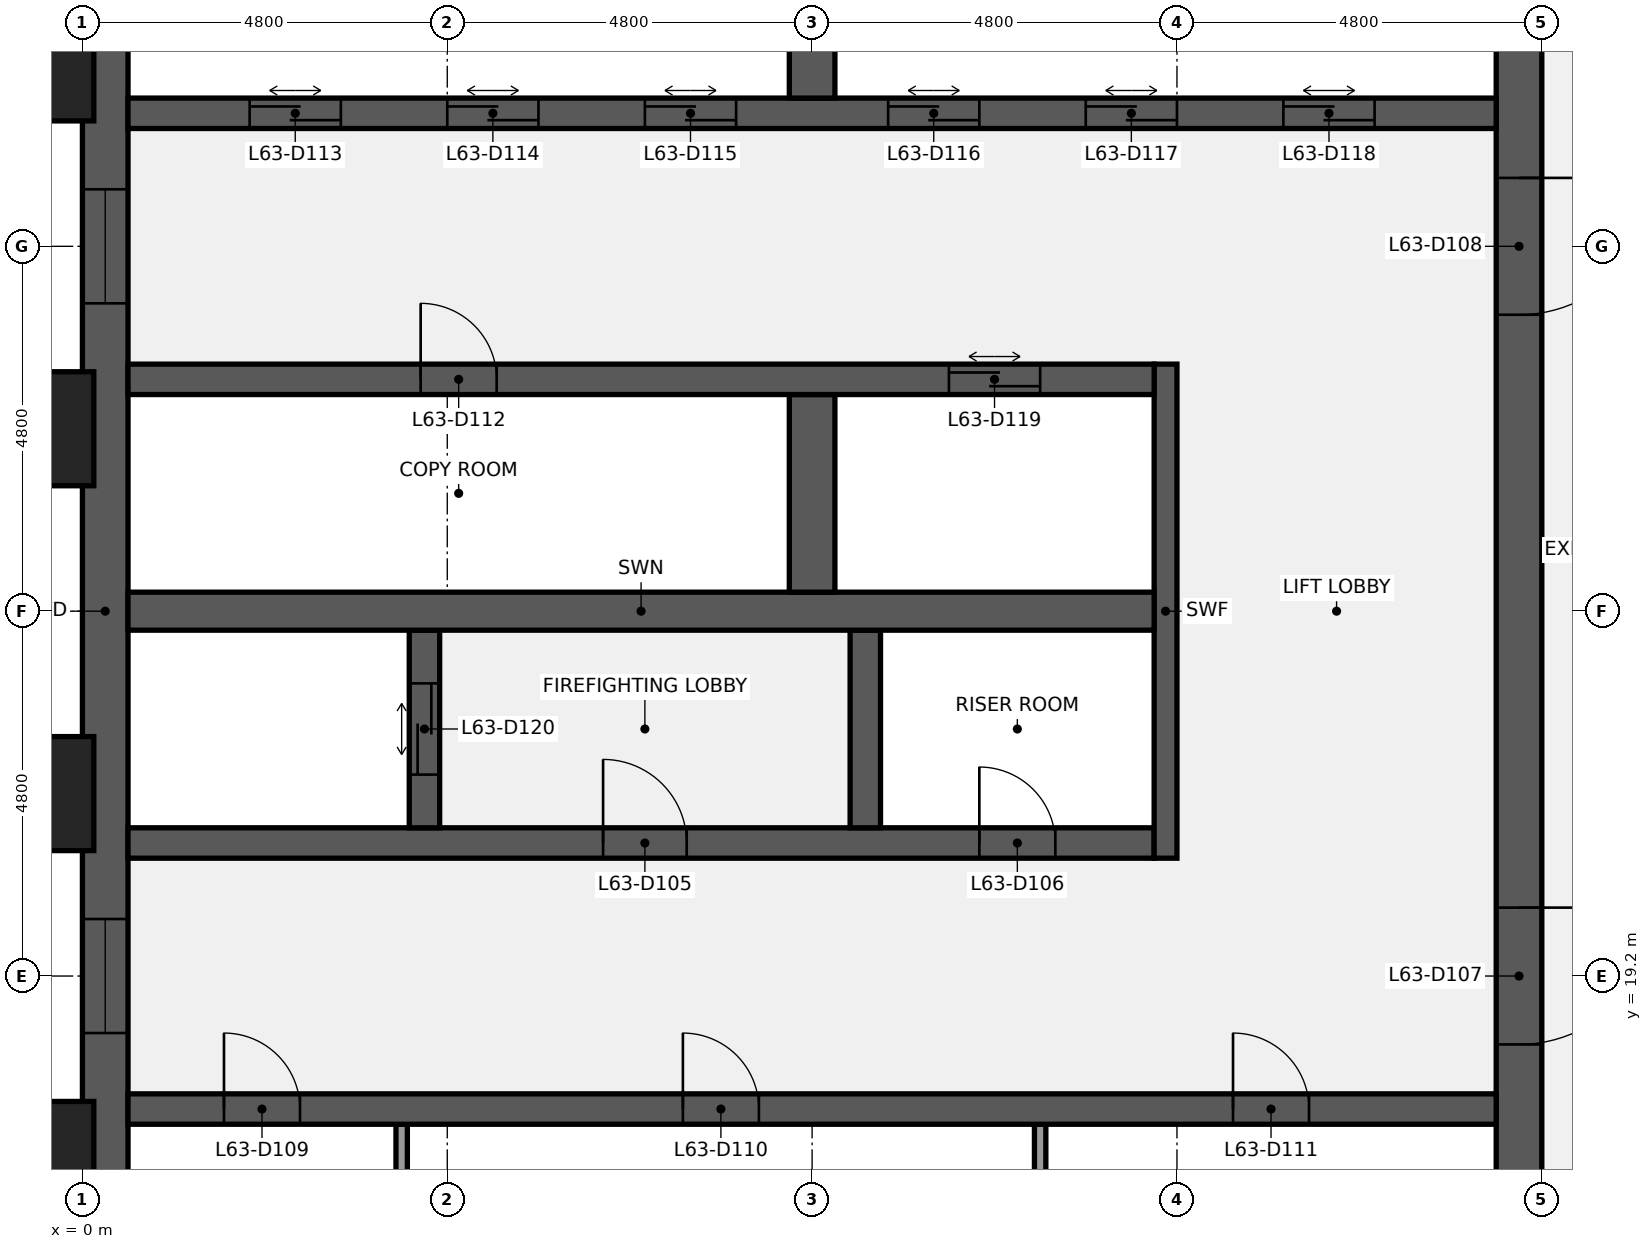
"""IFC4 building model, lengths in metres.
Left out: names, types, materials, properties, quantities, classifications, styles, units other than length and angle.
Written with IfcOpenShell. Run it as: python <this file> out.ifc"""

import sys

from ifc_helpers import new_model, si_unit, direction, frame, frame_2d, origin, origin_2d, place, context, subcontext, project, spatial, rectangle, extrude, element, fill, save


model = new_model("IFC4")
c1 = context("Model", 3, precision=1e-05, world=origin(), true_north=direction((0.0, 1.0)))
c2 = subcontext(c1, "Body", "Model", "MODEL_VIEW")
j1 = project(units=[si_unit("LENGTHUNIT", "METRE"), si_unit("PLANEANGLEUNIT", "RADIAN")], contexts=[c1])
p1 = place(None, origin())
s1 = spatial("IfcSite", under=j1, at=p1, CompositionType="ELEMENT")
p2 = place(p1, origin())
s2 = spatial("IfcBuilding", under=s1, at=p2, CompositionType="ELEMENT")
p3 = place(p2, frame((0.0, 0.0, 290.3)))
s3 = spatial("IfcBuildingStorey", under=s2, at=p3, CompositionType="ELEMENT", Elevation=290.3)
p4 = place(p3, frame((0.3, 9.6, 0.0), z_axis=(0.0, 0.0, 1.0), x_axis=(0.0, 1.0, 0.0)))
e1 = element("IfcWall", 1, at=p4, inside=s3, PredefinedType="SHEAR", context=c2, shape_type="SweptSolid", body=[
    extrude(rectangle(XDim=28.8, YDim=0.6, at=frame_2d((14.4, 0.0))), origin(), (0.0, 0.0, 1.0), 3.84),
])
p5 = place(p4, frame((8.85, 0.0, 0.9)))
e2 = element("IfcOpeningElement", 2, at=p5, cuts=e1, PredefinedType="OPENING", context=c2, shape_type="SweptSolid", body=[
    extrude(rectangle(XDim=1.5, YDim=1.5, at=frame_2d((0.75, 0.75))), frame((0.0, 0.31, 0.0), z_axis=(0.0, -1.0, 0.0), x_axis=(1.0, 0.0, 0.0)), (0.0, 0.0, 1.0), 0.62),
])
p6 = place(p4, frame((18.45, 0.0, 0.9)))
e3 = element("IfcOpeningElement", 3, at=p6, cuts=e1, PredefinedType="OPENING", context=c2, shape_type="SweptSolid", body=[
    extrude(rectangle(XDim=1.5, YDim=1.5, at=frame_2d((0.75, 0.75))), frame((0.0, 0.31, 0.0), z_axis=(0.0, -1.0, 0.0), x_axis=(1.0, 0.0, 0.0)), (0.0, 0.0, 1.0), 0.62),
])
p7 = place(p3, frame((18.9, 38.4, 0.0), z_axis=(0.0, 0.0, 1.0), x_axis=(0.0, -1.0, 0.0)))
e4 = element("IfcWall", 4, at=p7, inside=s3, PredefinedType="SHEAR", context=c2, shape_type="SweptSolid", body=[
    extrude(rectangle(XDim=28.8, YDim=0.6, at=frame_2d((14.4, 0.0))), origin(), (0.0, 0.0, 1.0), 3.84),
])
p8 = place(p7, frame((18.3, 0.0, 0.0)))
e5 = element("IfcOpeningElement", 5, at=p8, cuts=e4, PredefinedType="OPENING", context=c2, shape_type="SweptSolid", body=[
    extrude(rectangle(XDim=1.8, YDim=2.1, at=frame_2d((0.9, 1.05))), frame((0.0, 0.31, 0.0), z_axis=(0.0, -1.0, 0.0), x_axis=(1.0, 0.0, 0.0)), (0.0, 0.0, 1.0), 0.62),
])
p9 = place(p7, frame((8.7, 0.0, 0.0)))
e6 = element("IfcOpeningElement", 6, at=p9, cuts=e4, PredefinedType="OPENING", context=c2, shape_type="SweptSolid", body=[
    extrude(rectangle(XDim=1.8, YDim=2.1, at=frame_2d((0.9, 1.05))), frame((0.0, 0.31, 0.0), z_axis=(0.0, -1.0, 0.0), x_axis=(1.0, 0.0, 0.0)), (0.0, 0.0, 1.0), 0.62),
])
for number, where, z_axis, x_axis in (
    (7, (4.2, 14.65, 0.0), (0.0, 0.0, 1.0), (0.0, 1.0, 0.0)),
    (8, (12.6, 14.65, 0.0), (0.0, 0.0, 1.0), (0.0, 1.0, 0.0)),
):
    element("IfcWall", number, at=place(p3, frame(where, z_axis=z_axis, x_axis=x_axis)), inside=s3, PredefinedType="PARTITIONING", context=c2, shape_type="SweptSolid", body=[
        extrude(rectangle(XDim=2.6, YDim=0.15, at=frame_2d((1.3, 0.0))), origin(), (0.0, 0.0, 1.0), 3.84),
    ])
p10 = place(p3, frame((0.6, 17.45, 0.0), z_axis=(0.0, 0.0, 1.0), x_axis=(1.0, 0.0, 0.0)))
e9 = element("IfcWall", 9, at=p10, inside=s3, PredefinedType="SHEAR", context=c2, shape_type="SweptSolid", body=[
    extrude(rectangle(XDim=18.0, YDim=0.4, at=frame_2d((9.0, 0.0))), origin(), (0.0, 0.0, 1.0), 3.84),
])
p11 = place(p10, frame((1.262, 0.0, 0.0)))
e10 = element("IfcOpeningElement", 10, at=p11, cuts=e9, PredefinedType="OPENING", context=c2, shape_type="SweptSolid", body=[
    extrude(rectangle(XDim=1.0, YDim=2.1, at=frame_2d((0.5, 1.05))), frame((0.0, 0.21, 0.0), z_axis=(0.0, -1.0, 0.0), x_axis=(1.0, 0.0, 0.0)), (0.0, 0.0, 1.0), 0.42),
])
p12 = place(p10, frame((7.3, 0.0, 0.0)))
e11 = element("IfcOpeningElement", 11, at=p12, cuts=e9, PredefinedType="OPENING", context=c2, shape_type="SweptSolid", body=[
    extrude(rectangle(XDim=1.0, YDim=2.1, at=frame_2d((0.5, 1.05))), frame((0.0, 0.21, 0.0), z_axis=(0.0, -1.0, 0.0), x_axis=(1.0, 0.0, 0.0)), (0.0, 0.0, 1.0), 0.42),
])
p13 = place(p10, frame((14.538, 0.0, 0.0)))
e12 = element("IfcOpeningElement", 12, at=p13, cuts=e9, PredefinedType="OPENING", context=c2, shape_type="SweptSolid", body=[
    extrude(rectangle(XDim=1.0, YDim=2.1, at=frame_2d((0.5, 1.05))), frame((0.0, 0.21, 0.0), z_axis=(0.0, -1.0, 0.0), x_axis=(1.0, 0.0, 0.0)), (0.0, 0.0, 1.0), 0.42),
])
p14 = place(p3, frame((0.6, 20.95, 0.0), z_axis=(0.0, 0.0, 1.0), x_axis=(1.0, 0.0, 0.0)))
e13 = element("IfcWall", 13, at=p14, inside=s3, PredefinedType="SHEAR", context=c2, shape_type="SweptSolid", body=[
    extrude(rectangle(XDim=13.5, YDim=0.4, at=frame_2d((6.75, 0.0))), origin(), (0.0, 0.0, 1.0), 3.84),
])
p15 = place(p14, frame((6.25, 0.0, 0.0)))
e14 = element("IfcOpeningElement", 14, at=p15, cuts=e13, PredefinedType="OPENING", context=c2, shape_type="SweptSolid", body=[
    extrude(rectangle(XDim=1.1, YDim=2.1, at=frame_2d((0.55, 1.05))), frame((0.0, 0.21, 0.0), z_axis=(0.0, -1.0, 0.0), x_axis=(1.0, 0.0, 0.0)), (0.0, 0.0, 1.0), 0.42),
])
p16 = place(p14, frame((11.2, 0.0, 0.0)))
e15 = element("IfcOpeningElement", 15, at=p16, cuts=e13, PredefinedType="OPENING", context=c2, shape_type="SweptSolid", body=[
    extrude(rectangle(XDim=1.0, YDim=2.1, at=frame_2d((0.5, 1.05))), frame((0.0, 0.21, 0.0), z_axis=(0.0, -1.0, 0.0), x_axis=(1.0, 0.0, 0.0)), (0.0, 0.0, 1.0), 0.42),
])
p17 = place(p3, frame((14.25, 20.75, 0.0), z_axis=(0.0, 0.0, 1.0), x_axis=(0.0, 1.0, 0.0)))
e16 = element("IfcWall", 16, at=p17, inside=s3, PredefinedType="SHEAR", context=c2, shape_type="SweptSolid", body=[
    extrude(rectangle(XDim=6.5, YDim=0.3, at=frame_2d((3.25, 0.0))), origin(), (0.0, 0.0, 1.0), 3.84),
])
p18 = place(p3, frame((4.5, 21.15, 0.0), z_axis=(0.0, 0.0, 1.0), x_axis=(0.0, 1.0, 0.0)))
e17 = element("IfcWall", 17, at=p18, inside=s3, PredefinedType="SHEAR", context=c2, shape_type="SweptSolid", body=[
    extrude(rectangle(XDim=2.6, YDim=0.4, at=frame_2d((1.3, 0.0))), origin(), (0.0, 0.0, 1.0), 3.84),
])
p19 = place(p18, frame((0.7, 0.0, 0.0)))
e18 = element("IfcOpeningElement", 18, at=p19, cuts=e17, PredefinedType="OPENING", context=c2, shape_type="SweptSolid", body=[
    extrude(rectangle(XDim=1.2, YDim=2.1, at=frame_2d((0.6, 1.05))), frame((0.0, 0.21, 0.0), z_axis=(0.0, -1.0, 0.0), x_axis=(1.0, 0.0, 0.0)), (0.0, 0.0, 1.0), 0.42),
])
p20 = place(p3, frame((10.3, 21.15, 0.0), z_axis=(0.0, 0.0, 1.0), x_axis=(0.0, 1.0, 0.0)))
e19 = element("IfcWall", 19, at=p20, inside=s3, PredefinedType="SHEAR", context=c2, shape_type="SweptSolid", body=[
    extrude(rectangle(XDim=2.6, YDim=0.4, at=frame_2d((1.3, 0.0))), origin(), (0.0, 0.0, 1.0), 3.84),
])
p21 = place(p3, frame((0.6, 24.0, 0.0), z_axis=(0.0, 0.0, 1.0), x_axis=(1.0, 0.0, 0.0)))
e20 = element("IfcWall", 20, at=p21, inside=s3, PredefinedType="SHEAR", context=c2, shape_type="SweptSolid", body=[
    extrude(rectangle(XDim=13.5, YDim=0.5, at=frame_2d((6.75, 0.0))), origin(), (0.0, 0.0, 1.0), 3.84),
])
p22 = place(p3, frame((9.6, 24.25, 0.0), z_axis=(0.0, 0.0, 1.0), x_axis=(0.0, 1.0, 0.0)))
e21 = element("IfcWall", 21, at=p22, inside=s3, PredefinedType="SHEAR", context=c2, shape_type="SweptSolid", body=[
    extrude(rectangle(XDim=2.6, YDim=0.6, at=frame_2d((1.3, 0.0))), origin(), (0.0, 0.0, 1.0), 3.84),
])
p23 = place(p3, frame((0.6, 27.05, 0.0), z_axis=(0.0, 0.0, 1.0), x_axis=(1.0, 0.0, 0.0)))
e22 = element("IfcWall", 22, at=p23, inside=s3, PredefinedType="SHEAR", context=c2, shape_type="SweptSolid", body=[
    extrude(rectangle(XDim=13.5, YDim=0.4, at=frame_2d((6.75, 0.0))), origin(), (0.0, 0.0, 1.0), 3.84),
])
p24 = place(p23, frame((3.85, 0.0, 0.0)))
e23 = element("IfcOpeningElement", 23, at=p24, cuts=e22, PredefinedType="OPENING", context=c2, shape_type="SweptSolid", body=[
    extrude(rectangle(XDim=1.0, YDim=2.1, at=frame_2d((0.5, 1.05))), frame((0.0, 0.21, 0.0), z_axis=(0.0, -1.0, 0.0), x_axis=(1.0, 0.0, 0.0)), (0.0, 0.0, 1.0), 0.42),
])
p25 = place(p23, frame((10.8, 0.0, 0.0)))
e24 = element("IfcOpeningElement", 24, at=p25, cuts=e22, PredefinedType="OPENING", context=c2, shape_type="SweptSolid", body=[
    extrude(rectangle(XDim=1.2, YDim=2.1, at=frame_2d((0.6, 1.05))), frame((0.0, 0.21, 0.0), z_axis=(0.0, -1.0, 0.0), x_axis=(1.0, 0.0, 0.0)), (0.0, 0.0, 1.0), 0.42),
])
p26 = place(p3, frame((0.6, 30.55, 0.0), z_axis=(0.0, 0.0, 1.0), x_axis=(1.0, 0.0, 0.0)))
e25 = element("IfcWall", 25, at=p26, inside=s3, PredefinedType="SHEAR", context=c2, shape_type="SweptSolid", body=[
    extrude(rectangle(XDim=18.0, YDim=0.4, at=frame_2d((9.0, 0.0))), origin(), (0.0, 0.0, 1.0), 3.84),
])
p27 = place(p26, frame((1.6, 0.0, 0.0)))
e26 = element("IfcOpeningElement", 26, at=p27, cuts=e25, PredefinedType="OPENING", context=c2, shape_type="SweptSolid", body=[
    extrude(rectangle(XDim=1.2, YDim=2.1, at=frame_2d((0.6, 1.05))), frame((0.0, 0.21, 0.0), z_axis=(0.0, -1.0, 0.0), x_axis=(1.0, 0.0, 0.0)), (0.0, 0.0, 1.0), 0.42),
])
p28 = place(p26, frame((4.2, 0.0, 0.0)))
e27 = element("IfcOpeningElement", 27, at=p28, cuts=e25, PredefinedType="OPENING", context=c2, shape_type="SweptSolid", body=[
    extrude(rectangle(XDim=1.2, YDim=2.1, at=frame_2d((0.6, 1.05))), frame((0.0, 0.21, 0.0), z_axis=(0.0, -1.0, 0.0), x_axis=(1.0, 0.0, 0.0)), (0.0, 0.0, 1.0), 0.42),
])
p29 = place(p26, frame((6.8, 0.0, 0.0)))
e28 = element("IfcOpeningElement", 28, at=p29, cuts=e25, PredefinedType="OPENING", context=c2, shape_type="SweptSolid", body=[
    extrude(rectangle(XDim=1.2, YDim=2.1, at=frame_2d((0.6, 1.05))), frame((0.0, 0.21, 0.0), z_axis=(0.0, -1.0, 0.0), x_axis=(1.0, 0.0, 0.0)), (0.0, 0.0, 1.0), 0.42),
])
p30 = place(p26, frame((10.0, 0.0, 0.0)))
e29 = element("IfcOpeningElement", 29, at=p30, cuts=e25, PredefinedType="OPENING", context=c2, shape_type="SweptSolid", body=[
    extrude(rectangle(XDim=1.2, YDim=2.1, at=frame_2d((0.6, 1.05))), frame((0.0, 0.21, 0.0), z_axis=(0.0, -1.0, 0.0), x_axis=(1.0, 0.0, 0.0)), (0.0, 0.0, 1.0), 0.42),
])
p31 = place(p26, frame((12.6, 0.0, 0.0)))
e30 = element("IfcOpeningElement", 30, at=p31, cuts=e25, PredefinedType="OPENING", context=c2, shape_type="SweptSolid", body=[
    extrude(rectangle(XDim=1.2, YDim=2.1, at=frame_2d((0.6, 1.05))), frame((0.0, 0.21, 0.0), z_axis=(0.0, -1.0, 0.0), x_axis=(1.0, 0.0, 0.0)), (0.0, 0.0, 1.0), 0.42),
])
p32 = place(p26, frame((15.2, 0.0, 0.0)))
e31 = element("IfcOpeningElement", 31, at=p32, cuts=e25, PredefinedType="OPENING", context=c2, shape_type="SweptSolid", body=[
    extrude(rectangle(XDim=1.2, YDim=2.1, at=frame_2d((0.6, 1.05))), frame((0.0, 0.21, 0.0), z_axis=(0.0, -1.0, 0.0), x_axis=(1.0, 0.0, 0.0)), (0.0, 0.0, 1.0), 0.42),
])
p33 = place(p3, frame((9.6, 30.75, 0.0), z_axis=(0.0, 0.0, 1.0), x_axis=(0.0, 1.0, 0.0)))
e32 = element("IfcWall", 32, at=p33, inside=s3, PredefinedType="SHEAR", context=c2, shape_type="SweptSolid", body=[
    extrude(rectangle(XDim=2.6, YDim=0.6, at=frame_2d((1.3, 0.0))), origin(), (0.0, 0.0, 1.0), 3.84),
])
for number, where, z_axis, x_axis in (
    (33, (-0.75, 16.8, 0.0), (0.0, 0.0, 1.0), (0.0, 1.0, 0.0)),
    (34, (-0.75, 21.6, 0.0), (0.0, 0.0, 1.0), (0.0, 1.0, 0.0)),
    (35, (-0.75, 26.4, 0.0), (0.0, 0.0, 1.0), (0.0, 1.0, 0.0)),
    (36, (-0.75, 31.2, 0.0), (0.0, 0.0, 1.0), (0.0, 1.0, 0.0)),
):
    element("IfcColumn", number, at=place(p3, frame(where, z_axis=z_axis, x_axis=x_axis)), inside=s3, PredefinedType="PILASTER", context=c2, shape_type="SweptSolid", body=[
        extrude(rectangle(XDim=1.8, YDim=1.5, at=origin_2d()), origin(), (0.0, 0.0, 1.0), 4.0),
    ])
p34 = place(p15, origin())
e37 = element("IfcDoor", 37, at=p34, inside=s3, OperationType="SINGLE_SWING_LEFT", PredefinedType="DOOR", context=c2, shape_type="SweptSolid", body=[
    extrude(rectangle(XDim=1.1, YDim=2.1, at=frame_2d((0.55, 1.05))), frame((0.0, 0.025, 0.0), z_axis=(0.0, -1.0, 0.0), x_axis=(1.0, 0.0, 0.0)), (0.0, 0.0, 1.0), 0.05),
])
fill(e14, e37)
p35 = place(p16, origin())
e38 = element("IfcDoor", 38, at=p35, inside=s3, OperationType="SINGLE_SWING_LEFT", PredefinedType="DOOR", context=c2, shape_type="SweptSolid", body=[
    extrude(rectangle(XDim=1.0, YDim=2.1, at=frame_2d((0.5, 1.05))), frame((0.0, 0.025, 0.0), z_axis=(0.0, -1.0, 0.0), x_axis=(1.0, 0.0, 0.0)), (0.0, 0.0, 1.0), 0.05),
])
fill(e15, e38)
p36 = place(p8, origin())
e39 = element("IfcDoor", 39, at=p36, inside=s3, OperationType="DOUBLE_DOOR_SINGLE_SWING", PredefinedType="DOOR", context=c2, shape_type="SweptSolid", body=[
    extrude(rectangle(XDim=1.8, YDim=2.1, at=frame_2d((0.9, 1.05))), frame((0.0, 0.025, 0.0), z_axis=(0.0, -1.0, 0.0), x_axis=(1.0, 0.0, 0.0)), (0.0, 0.0, 1.0), 0.05),
])
fill(e5, e39)
p37 = place(p9, origin())
e40 = element("IfcDoor", 40, at=p37, inside=s3, OperationType="DOUBLE_DOOR_SINGLE_SWING", PredefinedType="DOOR", context=c2, shape_type="SweptSolid", body=[
    extrude(rectangle(XDim=1.8, YDim=2.1, at=frame_2d((0.9, 1.05))), frame((0.0, 0.025, 0.0), z_axis=(0.0, -1.0, 0.0), x_axis=(1.0, 0.0, 0.0)), (0.0, 0.0, 1.0), 0.05),
])
fill(e6, e40)
p38 = place(p11, origin())
e41 = element("IfcDoor", 41, at=p38, inside=s3, OperationType="SINGLE_SWING_LEFT", PredefinedType="DOOR", context=c2, shape_type="SweptSolid", body=[
    extrude(rectangle(XDim=1.0, YDim=2.1, at=frame_2d((0.5, 1.05))), frame((0.0, 0.025, 0.0), z_axis=(0.0, -1.0, 0.0), x_axis=(1.0, 0.0, 0.0)), (0.0, 0.0, 1.0), 0.05),
])
fill(e10, e41)
p39 = place(p12, origin())
e42 = element("IfcDoor", 42, at=p39, inside=s3, OperationType="SINGLE_SWING_LEFT", PredefinedType="DOOR", context=c2, shape_type="SweptSolid", body=[
    extrude(rectangle(XDim=1.0, YDim=2.1, at=frame_2d((0.5, 1.05))), frame((0.0, 0.025, 0.0), z_axis=(0.0, -1.0, 0.0), x_axis=(1.0, 0.0, 0.0)), (0.0, 0.0, 1.0), 0.05),
])
fill(e11, e42)
p40 = place(p13, origin())
e43 = element("IfcDoor", 43, at=p40, inside=s3, OperationType="SINGLE_SWING_LEFT", PredefinedType="DOOR", context=c2, shape_type="SweptSolid", body=[
    extrude(rectangle(XDim=1.0, YDim=2.1, at=frame_2d((0.5, 1.05))), frame((0.0, 0.025, 0.0), z_axis=(0.0, -1.0, 0.0), x_axis=(1.0, 0.0, 0.0)), (0.0, 0.0, 1.0), 0.05),
])
fill(e12, e43)
p41 = place(p24, origin())
e44 = element("IfcDoor", 44, at=p41, inside=s3, OperationType="SINGLE_SWING_LEFT", PredefinedType="DOOR", context=c2, shape_type="SweptSolid", body=[
    extrude(rectangle(XDim=1.0, YDim=2.1, at=frame_2d((0.5, 1.05))), frame((0.0, 0.025, 0.0), z_axis=(0.0, -1.0, 0.0), x_axis=(1.0, 0.0, 0.0)), (0.0, 0.0, 1.0), 0.05),
])
fill(e23, e44)
p42 = place(p27, origin())
e45 = element("IfcDoor", 45, at=p42, inside=s3, OperationType="DOUBLE_DOOR_SLIDING", PredefinedType="DOOR", context=c2, shape_type="SweptSolid", body=[
    extrude(rectangle(XDim=1.2, YDim=2.1, at=frame_2d((0.6, 1.05))), frame((0.0, 0.025, 0.0), z_axis=(0.0, -1.0, 0.0), x_axis=(1.0, 0.0, 0.0)), (0.0, 0.0, 1.0), 0.05),
])
fill(e26, e45)
p43 = place(p28, origin())
e46 = element("IfcDoor", 46, at=p43, inside=s3, OperationType="DOUBLE_DOOR_SLIDING", PredefinedType="DOOR", context=c2, shape_type="SweptSolid", body=[
    extrude(rectangle(XDim=1.2, YDim=2.1, at=frame_2d((0.6, 1.05))), frame((0.0, 0.025, 0.0), z_axis=(0.0, -1.0, 0.0), x_axis=(1.0, 0.0, 0.0)), (0.0, 0.0, 1.0), 0.05),
])
fill(e27, e46)
p44 = place(p29, origin())
e47 = element("IfcDoor", 47, at=p44, inside=s3, OperationType="DOUBLE_DOOR_SLIDING", PredefinedType="DOOR", context=c2, shape_type="SweptSolid", body=[
    extrude(rectangle(XDim=1.2, YDim=2.1, at=frame_2d((0.6, 1.05))), frame((0.0, 0.025, 0.0), z_axis=(0.0, -1.0, 0.0), x_axis=(1.0, 0.0, 0.0)), (0.0, 0.0, 1.0), 0.05),
])
fill(e28, e47)
p45 = place(p30, origin())
e48 = element("IfcDoor", 48, at=p45, inside=s3, OperationType="DOUBLE_DOOR_SLIDING", PredefinedType="DOOR", context=c2, shape_type="SweptSolid", body=[
    extrude(rectangle(XDim=1.2, YDim=2.1, at=frame_2d((0.6, 1.05))), frame((0.0, 0.025, 0.0), z_axis=(0.0, -1.0, 0.0), x_axis=(1.0, 0.0, 0.0)), (0.0, 0.0, 1.0), 0.05),
])
fill(e29, e48)
p46 = place(p31, origin())
e49 = element("IfcDoor", 49, at=p46, inside=s3, OperationType="DOUBLE_DOOR_SLIDING", PredefinedType="DOOR", context=c2, shape_type="SweptSolid", body=[
    extrude(rectangle(XDim=1.2, YDim=2.1, at=frame_2d((0.6, 1.05))), frame((0.0, 0.025, 0.0), z_axis=(0.0, -1.0, 0.0), x_axis=(1.0, 0.0, 0.0)), (0.0, 0.0, 1.0), 0.05),
])
fill(e30, e49)
p47 = place(p32, origin())
e50 = element("IfcDoor", 50, at=p47, inside=s3, OperationType="DOUBLE_DOOR_SLIDING", PredefinedType="DOOR", context=c2, shape_type="SweptSolid", body=[
    extrude(rectangle(XDim=1.2, YDim=2.1, at=frame_2d((0.6, 1.05))), frame((0.0, 0.025, 0.0), z_axis=(0.0, -1.0, 0.0), x_axis=(1.0, 0.0, 0.0)), (0.0, 0.0, 1.0), 0.05),
])
fill(e31, e50)
p48 = place(p25, origin())
e51 = element("IfcDoor", 51, at=p48, inside=s3, OperationType="DOUBLE_DOOR_SLIDING", PredefinedType="DOOR", context=c2, shape_type="SweptSolid", body=[
    extrude(rectangle(XDim=1.2, YDim=2.1, at=frame_2d((0.6, 1.05))), frame((0.0, 0.025, 0.0), z_axis=(0.0, -1.0, 0.0), x_axis=(1.0, 0.0, 0.0)), (0.0, 0.0, 1.0), 0.05),
])
fill(e24, e51)
p49 = place(p19, origin())
e52 = element("IfcDoor", 52, at=p49, inside=s3, OperationType="DOUBLE_DOOR_SLIDING", PredefinedType="DOOR", context=c2, shape_type="SweptSolid", body=[
    extrude(rectangle(XDim=1.2, YDim=2.1, at=frame_2d((0.6, 1.05))), frame((0.0, 0.025, 0.0), z_axis=(0.0, -1.0, 0.0), x_axis=(1.0, 0.0, 0.0)), (0.0, 0.0, 1.0), 0.05),
])
fill(e18, e52)
p50 = place(p5, origin())
e53 = element("IfcWindow", 53, at=p50, inside=s3, PartitioningType="SINGLE_PANEL", PredefinedType="WINDOW", context=c2, shape_type="SweptSolid", body=[
    extrude(rectangle(XDim=1.5, YDim=1.5, at=frame_2d((0.75, 0.75))), frame((0.0, 0.03, 0.0), z_axis=(0.0, -1.0, 0.0), x_axis=(1.0, 0.0, 0.0)), (0.0, 0.0, 1.0), 0.06),
])
fill(e2, e53)
p51 = place(p6, origin())
e54 = element("IfcWindow", 54, at=p51, inside=s3, PartitioningType="SINGLE_PANEL", PredefinedType="WINDOW", context=c2, shape_type="SweptSolid", body=[
    extrude(rectangle(XDim=1.5, YDim=1.5, at=frame_2d((0.75, 0.75))), frame((0.0, 0.03, 0.0), z_axis=(0.0, -1.0, 0.0), x_axis=(1.0, 0.0, 0.0)), (0.0, 0.0, 1.0), 0.06),
])
fill(e3, e54)
save(model, sys.argv[1])
